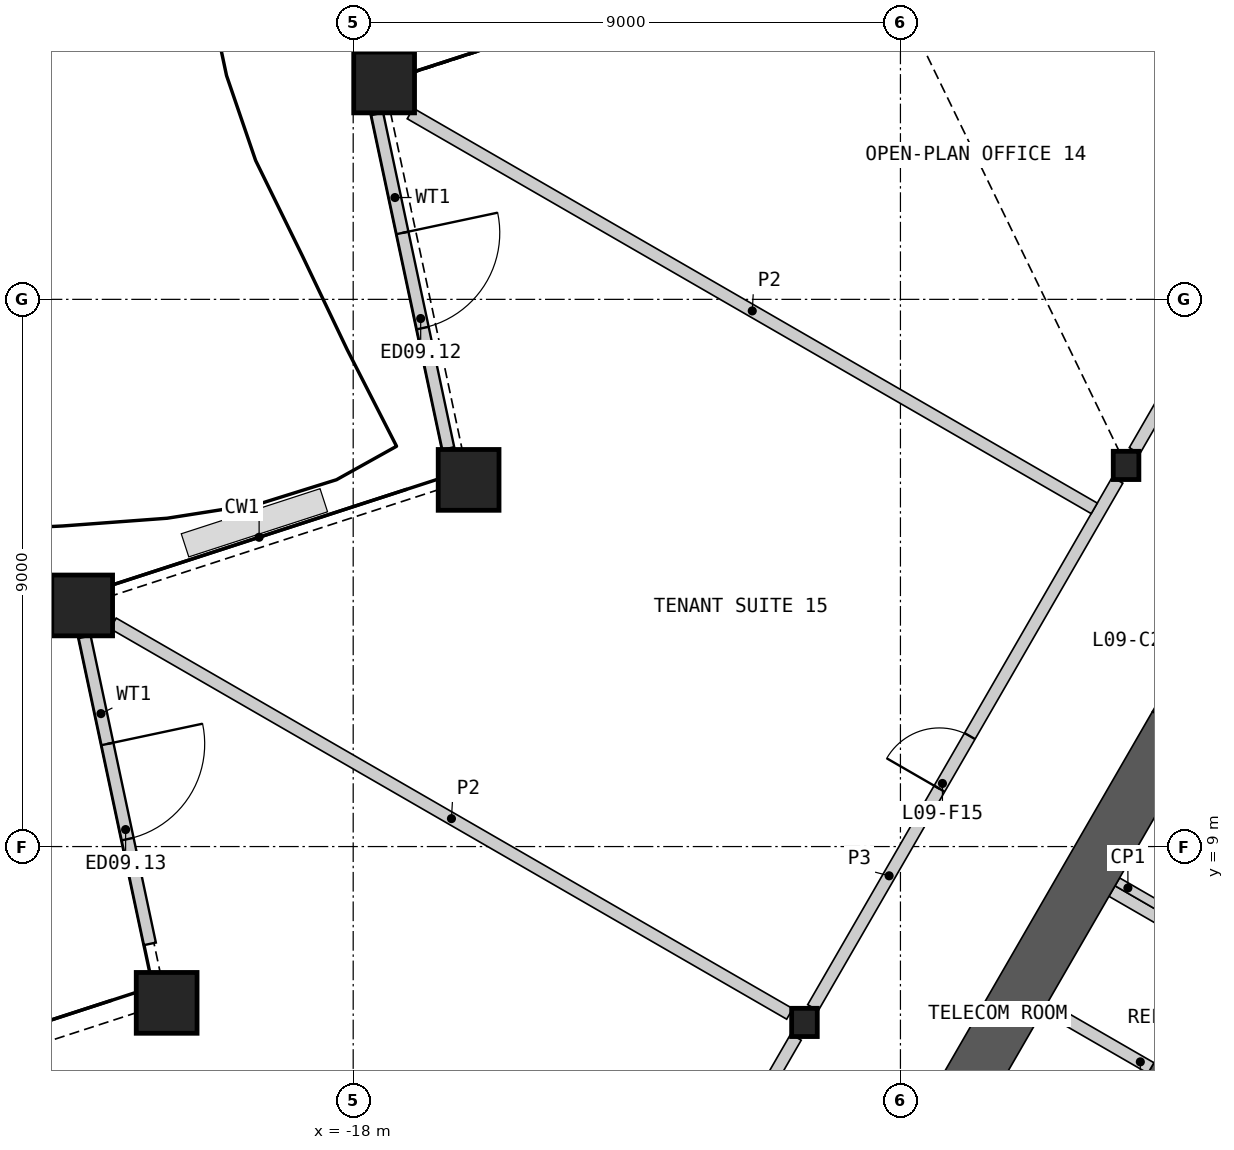
"""IFC4 building model, lengths in metres.
Left out: names, types, materials, properties, quantities, classifications, styles, units other than length and angle.
Written with IfcOpenShell. Run it as: python <this file> out.ifc"""

import sys

from ifc_helpers import new_model, si_unit, direction, frame, frame_2d, origin, origin_2d, place, context, subcontext, project, spatial, polyline, rectangle, hollow_rectangle, i_section, outline, extrude, element, fill, save


model = new_model("IFC4")
c1 = context("Model", 3, precision=1e-05, world=origin(), true_north=direction((0.0, 1.0)))
c2 = subcontext(c1, "Body", "Model", "MODEL_VIEW")
j1 = project(units=[si_unit("LENGTHUNIT", "METRE"), si_unit("PLANEANGLEUNIT", "RADIAN")], contexts=[c1])
p1 = place(None, origin())
s1 = spatial("IfcSite", under=j1, at=p1, CompositionType="ELEMENT")
p2 = place(p1, origin())
s2 = spatial("IfcBuilding", under=s1, at=p2, CompositionType="ELEMENT")
p3 = place(p2, frame((0.0, 0.0, 46.8)))
s3 = spatial("IfcBuildingStorey", under=s2, at=p3, CompositionType="ELEMENT", Elevation=46.8)
for number, where, z_axis, x_axis in (
    (1, (-17.491, 21.567, 0.0), (0.0, 0.0, 1.0), (1.0, 0.0, 0.0)),
    (2, (-16.102, 15.031, 0.0), (0.0, 0.0, 1.0), (1.0, 0.0, 0.0)),
    (3, (-22.457, 12.966, 0.0), (0.0, 0.0, 1.0), (1.0, 0.0, 0.0)),
    (4, (-21.068, 6.429, 0.0), (0.0, 0.0, 1.0), (1.0, 0.0, 0.0)),
):
    element("IfcColumn", number, at=place(p3, frame(where, z_axis=z_axis, x_axis=x_axis)), inside=s3, PredefinedType="COLUMN", context=c2, shape_type="SweptSolid", body=[
        extrude(hollow_rectangle(XDim=1.0, YDim=1.0, WallThickness=0.07, at=origin_2d()), origin(), (0.0, 0.0, 1.0), 4.2),
    ])
for number, where, z_axis, x_axis in (
    (5, (-5.289, 15.269, 0.0), (0.0, 0.0, 1.0), (1.0, 0.0, 0.0)),
    (6, (-10.578, 6.107, 0.0), (0.0, 0.0, 1.0), (1.0, 0.0, 0.0)),
):
    element("IfcColumn", number, at=place(p3, frame(where, z_axis=z_axis, x_axis=x_axis)), inside=s3, PredefinedType="COLUMN", context=c2, shape_type="SweptSolid", body=[
        extrude(i_section(OverallWidth=0.421, OverallDepth=0.465, WebThickness=0.045, FlangeThickness=0.072, at=origin_2d()), origin(), (0.0, 0.0, 1.0), 4.2),
    ])
p4 = place(p3, frame((-17.605, 21.051, 0.0), z_axis=(0.0, 0.0, 1.0), x_axis=(0.207901831982, -0.978149696242, 0.0)))
e7 = element("IfcWall", 7, at=p4, inside=s3, PredefinedType="SOLIDWALL", context=c2, shape_type="SweptSolid", body=[
    extrude(rectangle(XDim=5.626, YDim=0.2, at=frame_2d((2.813, 0.0))), origin(), (0.0, 0.0, 1.0), 3.189),
])
p5 = place(p4, frame((2.001, 0.0, 0.0)))
e8 = element("IfcOpeningElement", 8, at=p5, cuts=e7, PredefinedType="OPENING", context=c2, shape_type="SweptSolid", body=[
    extrude(rectangle(XDim=1.6, YDim=2.4, at=frame_2d((0.8, 1.2))), frame((0.0, 0.11, 0.0), z_axis=(0.0, -1.0, 0.0), x_axis=(1.0, 0.0, 0.0)), (0.0, 0.0, 1.0), 0.22),
])
p6 = place(p3, frame((-22.416, 12.449, 0.0), z_axis=(0.0, 0.0, 1.0), x_axis=(0.207907400709, -0.978148512615, 0.0)))
e9 = element("IfcWall", 9, at=p6, inside=s3, PredefinedType="SOLIDWALL", context=c2, shape_type="SweptSolid", body=[
    extrude(rectangle(XDim=5.162, YDim=0.2, at=frame_2d((2.581, 0.0))), origin(), (0.0, 0.0, 1.0), 3.189),
])
p7 = place(p6, frame((1.8, 0.0, 0.0)))
e10 = element("IfcOpeningElement", 10, at=p7, cuts=e9, PredefinedType="OPENING", context=c2, shape_type="SweptSolid", body=[
    extrude(rectangle(XDim=1.6, YDim=2.4, at=frame_2d((0.8, 1.2))), frame((0.0, 0.11, 0.0), z_axis=(0.0, -1.0, 0.0), x_axis=(1.0, 0.0, 0.0)), (0.0, 0.0, 1.0), 0.22),
])
p8 = place(p3, origin())
e11 = element("IfcWall", 11, at=p8, inside=s3, PredefinedType="SHEAR", context=c2, shape_type="SweptSolid", body=[
    extrude(outline(polyline([(-2.76, 4.019), (-4.931, 5.272), (-4.831, 5.445), (-2.66, 4.192), (-2.76, 4.019)])), origin(), (0.0, 0.0, 1.0), 3.8),
])
p9 = place(p3, frame((-1.631, 5.776, 0.0), z_axis=(0.0, 0.0, 1.0), x_axis=(-0.499992876559, -0.866029516466, 0.0)))
e12 = element("IfcWall", 12, at=p9, inside=s3, PredefinedType="SOLIDWALL", context=c2, shape_type="SweptSolid", body=[
    extrude(rectangle(XDim=6.486, YDim=0.2, at=frame_2d((3.243, 0.0))), origin(), (0.0, 0.0, 1.0), 3.8),
])
p10 = place(p9, frame((0.437, 0.0, 0.0)))
e13 = element("IfcOpeningElement", 13, at=p10, cuts=e12, PredefinedType="OPENING", context=c2, shape_type="SweptSolid", body=[
    extrude(rectangle(XDim=0.9, YDim=2.1, at=frame_2d((0.45, 1.05))), frame((0.0, 0.11, 0.0), z_axis=(0.0, -1.0, 0.0), x_axis=(1.0, 0.0, 0.0)), (0.0, 0.0, 1.0), 0.22),
])
p11 = place(p9, frame((2.637, 0.0, 0.0)))
e14 = element("IfcOpeningElement", 14, at=p11, cuts=e12, PredefinedType="OPENING", context=c2, shape_type="SweptSolid", body=[
    extrude(rectangle(XDim=0.9, YDim=2.1, at=frame_2d((0.45, 1.05))), frame((0.0, 0.11, 0.0), z_axis=(0.0, -1.0, 0.0), x_axis=(1.0, 0.0, 0.0)), (0.0, 0.0, 1.0), 0.22),
])
p12 = place(p3, frame((-3.781, 7.263, 0.0), z_axis=(0.0, 0.0, 1.0), x_axis=(-0.865983199114, 0.50007309351, 0.0)))
e15 = element("IfcWall", 15, at=p12, inside=s3, PredefinedType="SHEAR", context=c2, shape_type="SweptSolid", body=[
    extrude(rectangle(XDim=2.009, YDim=0.2, at=frame_2d((1.004, 0.0))), origin(), (0.0, 0.0, 1.0), 3.8),
])
p13 = place(p3, frame((-4.881, 5.358, 0.0), z_axis=(0.0, 0.0, 1.0), x_axis=(-0.866035824272, 0.499981950752, 0.0)))
e16 = element("IfcWall", 16, at=p13, inside=s3, PredefinedType="SHEAR", context=c2, shape_type="SweptSolid", body=[
    extrude(rectangle(XDim=2.009, YDim=0.2, at=frame_2d((1.004, 0.0))), origin(), (0.0, 0.0, 1.0), 3.8),
])
p14 = place(p3, frame((-3.693, 7.415, 0.0), z_axis=(0.0, 0.0, 1.0), x_axis=(-0.866035824272, 0.499981950752, 0.0)))
e17 = element("IfcWall", 17, at=p14, inside=s3, PredefinedType="PARTITIONING", context=c2, shape_type="SweptSolid", body=[
    extrude(rectangle(XDim=2.009, YDim=0.15, at=frame_2d((1.004, 0.0))), origin(), (0.0, 0.0, 1.0), 3.8),
])
p15 = place(p3, frame((-4.466, 10.995, 0.0), z_axis=(0.0, 0.0, 1.0), x_axis=(-0.500012427149, -0.866018228848, 0.0)))
e18 = element("IfcWall", 18, at=p15, inside=s3, PredefinedType="SHEAR", context=c2, shape_type="SweptSolid", body=[
    extrude(rectangle(XDim=7.409, YDim=0.9, at=frame_2d((3.705, 0.0))), origin(), (0.0, 0.0, 1.0), 3.8),
])
p16 = place(p3, frame((-3.365, 12.9, 0.0), z_axis=(0.0, 0.0, 1.0), x_axis=(-0.500077893725, -0.86598042715, 0.0)))
e19 = element("IfcWall", 19, at=p16, inside=s3, PredefinedType="SHEAR", context=c2, shape_type="SweptSolid", body=[
    extrude(rectangle(XDim=2.2, YDim=0.9, at=frame_2d((1.1, 0.0))), origin(), (0.0, 0.0, 1.0), 3.8),
])
p17 = place(p16, frame((0.6, 0.0, 0.0)))
e20 = element("IfcOpeningElement", 20, at=p17, cuts=e19, PredefinedType="OPENING", context=c2, shape_type="SweptSolid", body=[
    extrude(rectangle(XDim=1.0, YDim=2.1, at=frame_2d((0.5, 1.05))), frame((0.0, 0.46, 0.0), z_axis=(0.0, -1.0, 0.0), x_axis=(1.0, 0.0, 0.0)), (0.0, 0.0, 1.0), 0.92),
])
p18 = place(p3, frame((-10.439, 6.35, 0.0), z_axis=(0.0, 0.0, 1.0), x_axis=(0.50001002959, 0.86601961312, 0.0)))
e21 = element("IfcWall", 21, at=p18, inside=s3, PredefinedType="PARTITIONING", context=c2, shape_type="SweptSolid", body=[
    extrude(rectangle(XDim=10.019, YDim=0.2, at=frame_2d((5.009, 0.0))), origin(), (0.0, 0.0, 1.0), 3.8),
])
p19 = place(p18, frame((4.159, 0.0, 0.0)))
e22 = element("IfcOpeningElement", 22, at=p19, cuts=e21, PredefinedType="OPENING", context=c2, shape_type="SweptSolid", body=[
    extrude(rectangle(XDim=1.0, YDim=2.1, at=frame_2d((0.5, 1.05))), frame((0.0, 0.11, 0.0), z_axis=(0.0, -1.0, 0.0), x_axis=(1.0, 0.0, 0.0)), (0.0, 0.0, 1.0), 0.22),
])
p20 = place(p3, frame((-15.728, -2.811, 0.0), z_axis=(0.0, 0.0, 1.0), x_axis=(0.49999175339, 0.866030164915, 0.0)))
e23 = element("IfcWall", 23, at=p20, inside=s3, PredefinedType="PARTITIONING", context=c2, shape_type="SweptSolid", body=[
    extrude(rectangle(XDim=10.019, YDim=0.2, at=frame_2d((5.009, 0.0))), origin(), (0.0, 0.0, 1.0), 3.8),
])
p21 = place(p20, frame((4.059, 0.0, 0.0)))
e24 = element("IfcOpeningElement", 24, at=p21, cuts=e23, PredefinedType="OPENING", context=c2, shape_type="SweptSolid", body=[
    extrude(rectangle(XDim=1.8, YDim=2.1, at=frame_2d((0.9, 1.05))), frame((0.0, 0.11, 0.0), z_axis=(0.0, -1.0, 0.0), x_axis=(1.0, 0.0, 0.0)), (0.0, 0.0, 1.0), 0.22),
])
p22 = place(p3, frame((-5.149, 15.511, 0.0), z_axis=(0.0, 0.0, 1.0), x_axis=(0.500001069878, 0.866024786089, 0.0)))
e25 = element("IfcWall", 25, at=p22, inside=s3, PredefinedType="PARTITIONING", context=c2, shape_type="SweptSolid", body=[
    extrude(rectangle(XDim=6.473, YDim=0.2, at=frame_2d((3.236, 0.0))), origin(), (0.0, 0.0, 1.0), 3.8),
])
p23 = place(p22, frame((2.686, 0.0, 0.0)))
e26 = element("IfcOpeningElement", 26, at=p23, cuts=e25, PredefinedType="OPENING", context=c2, shape_type="SweptSolid", body=[
    extrude(rectangle(XDim=1.0, YDim=2.1, at=frame_2d((0.5, 1.05))), frame((0.0, 0.11, 0.0), z_axis=(0.0, -1.0, 0.0), x_axis=(1.0, 0.0, 0.0)), (0.0, 0.0, 1.0), 0.22),
])
p24 = place(p3, frame((-12.674, 29.659, 0.0), z_axis=(0.0, 0.0, 1.0), x_axis=(0.778730857737, -0.627358152261, 0.0)))
e27 = element("IfcWall", 27, at=p24, inside=s3, PredefinedType="PARTITIONING", context=c2, shape_type="SweptSolid", body=[
    extrude(rectangle(XDim=13.654, YDim=0.2, at=frame_2d((6.827, 0.0))), origin(), (0.0, 0.0, 1.0), 2.885),
])
p25 = place(p3, frame((-17.061, 21.057, 0.0), z_axis=(0.0, 0.0, 1.0), x_axis=(0.866020631549, -0.500008265664, 0.0)))
e28 = element("IfcWall", 28, at=p25, inside=s3, PredefinedType="PARTITIONING", context=c2, shape_type="SweptSolid", body=[
    extrude(rectangle(XDim=12.989, YDim=0.2, at=frame_2d((6.495, 0.0))), origin(), (0.0, 0.0, 1.0), 2.885),
])
p26 = place(p3, frame((-21.947, 12.671, 0.0), z_axis=(0.0, 0.0, 1.0), x_axis=(0.866026729935, -0.499997703033, 0.0)))
e29 = element("IfcWall", 29, at=p26, inside=s3, PredefinedType="PARTITIONING", context=c2, shape_type="SweptSolid", body=[
    extrude(rectangle(XDim=12.848, YDim=0.2, at=frame_2d((6.424, 0.0))), origin(), (0.0, 0.0, 1.0), 2.885),
])
p27 = place(p5, origin())
e30 = element("IfcDoor", 30, at=p27, inside=s3, OperationType="DOUBLE_DOOR_SINGLE_SWING", PredefinedType="DOOR", context=c2, shape_type="SweptSolid", body=[
    extrude(rectangle(XDim=1.6, YDim=2.4, at=frame_2d((0.8, 1.2))), frame((0.0, 0.025, 0.0), z_axis=(0.0, -1.0, 0.0), x_axis=(1.0, 0.0, 0.0)), (0.0, 0.0, 1.0), 0.05),
])
fill(e8, e30)
p28 = place(p7, origin())
e31 = element("IfcDoor", 31, at=p28, inside=s3, OperationType="DOUBLE_DOOR_SINGLE_SWING", PredefinedType="DOOR", context=c2, shape_type="SweptSolid", body=[
    extrude(rectangle(XDim=1.6, YDim=2.4, at=frame_2d((0.8, 1.2))), frame((0.0, 0.025, 0.0), z_axis=(0.0, -1.0, 0.0), x_axis=(1.0, 0.0, 0.0)), (0.0, 0.0, 1.0), 0.05),
])
fill(e10, e31)
p29 = place(p19, origin())
e32 = element("IfcDoor", 32, at=p29, inside=s3, OperationType="SINGLE_SWING_LEFT", PredefinedType="DOOR", context=c2, shape_type="SweptSolid", body=[
    extrude(rectangle(XDim=1.0, YDim=2.1, at=frame_2d((0.5, 1.05))), frame((0.0, 0.025, 0.0), z_axis=(0.0, -1.0, 0.0), x_axis=(1.0, 0.0, 0.0)), (0.0, 0.0, 1.0), 0.05),
])
fill(e22, e32)
save(model, sys.argv[1])
